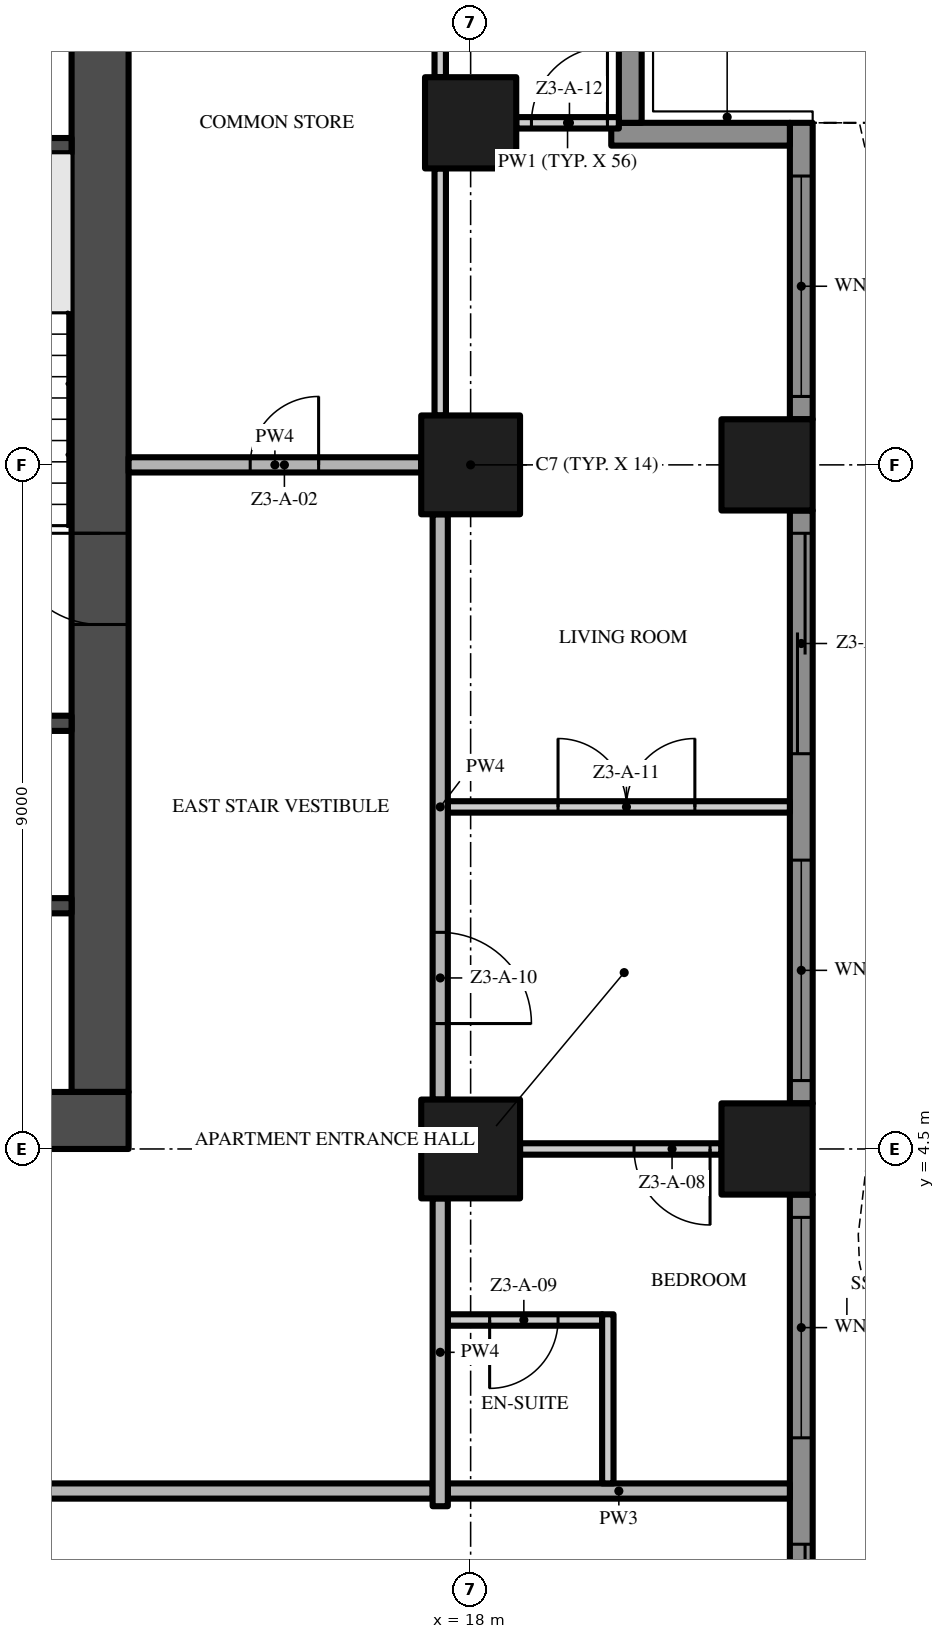
"""IFC4 building model, lengths in metres.
Left out: names, types, materials, properties, quantities, classifications, styles, units other than length and angle.
Written with IfcOpenShell. Run it as: python <this file> out.ifc"""

import sys

from ifc_helpers import new_model, si_unit, direction, frame, frame_2d, origin, origin_2d, place, context, subcontext, project, spatial, polyline, rectangle, outline, extrude, element, fill, save


model = new_model("IFC4")
c1 = context("Model", 3, precision=1e-05, world=origin(), true_north=direction((0.0, 1.0)))
c2 = subcontext(c1, "Body", "Model", "MODEL_VIEW")
j1 = project(units=[si_unit("LENGTHUNIT", "METRE"), si_unit("PLANEANGLEUNIT", "RADIAN")], contexts=[c1])
p1 = place(None, origin())
s1 = spatial("IfcSite", under=j1, at=p1, CompositionType="ELEMENT")
p2 = place(p1, origin())
s2 = spatial("IfcBuilding", under=s1, at=p2, CompositionType="ELEMENT")
p3 = place(p2, frame((0.0, 0.0, 132.6)))
s3 = spatial("IfcBuildingStorey", under=s2, at=p3, CompositionType="ELEMENT", Elevation=132.6)
p4 = place(p3, frame((-13.5, 4.875, -0.3), z_axis=(0.0, 0.0, 1.0), x_axis=(1.0, 0.0, 0.0)))
e1 = element("IfcWall", 1, at=p4, inside=s3, PredefinedType="SHEAR", context=c2, shape_type="SweptSolid", body=[
    extrude(rectangle(XDim=27.0, YDim=0.75, at=frame_2d((13.5, 0.0))), origin(), (0.0, 0.0, 1.0), 3.8),
])
p5 = place(p4, frame((12.0, 0.0, 0.3)))
e2 = element("IfcOpeningElement", 2, at=p5, cuts=e1, PredefinedType="OPENING", context=c2, shape_type="SweptSolid", body=[
    extrude(rectangle(XDim=3.0, YDim=2.4, at=frame_2d((1.5, 1.2))), frame((0.0, 0.385, 0.0), z_axis=(0.0, -1.0, 0.0), x_axis=(1.0, 0.0, 0.0)), (0.0, 0.0, 1.0), 0.77),
])
p6 = place(p4, frame((4.9, 0.0, 0.3)))
e3 = element("IfcOpeningElement", 3, at=p6, cuts=e1, PredefinedType="OPENING", context=c2, shape_type="SweptSolid", body=[
    extrude(rectangle(XDim=1.2, YDim=2.2, at=frame_2d((0.6, 1.1))), frame((0.0, 0.385, 0.0), z_axis=(0.0, -1.0, 0.0), x_axis=(1.0, 0.0, 0.0)), (0.0, 0.0, 1.0), 0.77),
])
p7 = place(p4, frame((20.75, 0.0, 0.3)))
e4 = element("IfcOpeningElement", 4, at=p7, cuts=e1, PredefinedType="OPENING", context=c2, shape_type="SweptSolid", body=[
    extrude(rectangle(XDim=1.5, YDim=2.2, at=frame_2d((0.75, 1.1))), frame((0.0, 0.385, 0.0), z_axis=(0.0, -1.0, 0.0), x_axis=(1.0, 0.0, 0.0)), (0.0, 0.0, 1.0), 0.77),
])
p8 = place(p4, frame((17.4, 0.0, 0.3)))
e5 = element("IfcOpeningElement", 5, at=p8, cuts=e1, PredefinedType="OPENING", context=c2, shape_type="SweptSolid", body=[
    extrude(rectangle(XDim=1.2, YDim=2.2, at=frame_2d((0.6, 1.1))), frame((0.0, 0.385, 0.0), z_axis=(0.0, -1.0, 0.0), x_axis=(1.0, 0.0, 0.0)), (0.0, 0.0, 1.0), 0.77),
])
p9 = place(p3, frame((13.125, 5.25, -0.3), z_axis=(0.0, 0.0, 1.0), x_axis=(0.0, 1.0, 0.0)))
e6 = element("IfcWall", 6, at=p9, inside=s3, PredefinedType="SHEAR", context=c2, shape_type="SweptSolid", body=[
    extrude(rectangle(XDim=16.5, YDim=0.75, at=frame_2d((8.25, 0.0))), origin(), (0.0, 0.0, 1.0), 3.8),
])
p10 = place(p9, frame((6.15, 0.0, 0.3)))
e7 = element("IfcOpeningElement", 7, at=p10, cuts=e6, PredefinedType="OPENING", context=c2, shape_type="SweptSolid", body=[
    extrude(rectangle(XDim=1.2, YDim=2.2, at=frame_2d((0.6, 1.1))), frame((0.0, 0.385, 0.0), z_axis=(0.0, -1.0, 0.0), x_axis=(1.0, 0.0, 0.0)), (0.0, 0.0, 1.0), 0.77),
])
for number, where, z_axis, x_axis in (
    (8, (18.0, 13.5, 0.0), (0.0, 0.0, 1.0), (1.0, 0.0, 0.0)),
    (9, (18.0, 4.5, 0.0), (0.0, 0.0, 1.0), (1.0, 0.0, 0.0)),
):
    element("IfcColumn", number, at=place(p3, frame(where, z_axis=z_axis, x_axis=x_axis)), inside=s3, PredefinedType="COLUMN", context=c2, shape_type="SweptSolid", body=[
        extrude(rectangle(XDim=1.3, YDim=1.3, at=origin_2d()), origin(), (0.0, 0.0, 1.0), 3.5),
    ])
for number, where, z_axis, x_axis in (
    (10, (21.9, 13.5, 0.0), (0.0, 0.0, 1.0), (1.0, 0.0, 0.0)),
    (11, (18.0, 18.0, 0.0), (0.0, 0.0, 1.0), (1.0, 0.0, 0.0)),
    (12, (21.9, 4.5, 0.0), (0.0, 0.0, 1.0), (1.0, 0.0, 0.0)),
):
    element("IfcColumn", number, at=place(p3, frame(where, z_axis=z_axis, x_axis=x_axis)), inside=s3, PredefinedType="COLUMN", context=c2, shape_type="SweptSolid", body=[
        extrude(rectangle(XDim=1.2, YDim=1.2, at=origin_2d()), origin(), (0.0, 0.0, 1.0), 3.5),
    ])
p11 = place(p3, frame((22.35, 3.9, 0.0), z_axis=(0.0, 0.0, 1.0), x_axis=(0.0, -1.0, 0.0)))
e13 = element("IfcWall", 13, at=p11, inside=s3, PredefinedType="SOLIDWALL", context=c2, shape_type="SweptSolid", body=[
    extrude(rectangle(XDim=7.8, YDim=0.3, at=frame_2d((3.9, 0.0))), origin(), (0.0, 0.0, 1.0), 3.5),
])
p12 = place(p11, frame((4.6, 0.0, 0.0)))
e14 = element("IfcOpeningElement", 14, at=p12, cuts=e13, PredefinedType="OPENING", context=c2, shape_type="SweptSolid", body=[
    extrude(rectangle(XDim=2.9, YDim=2.4, at=frame_2d((1.45, 1.2))), frame((0.0, 0.16, 0.0), z_axis=(0.0, -1.0, 0.0), x_axis=(1.0, 0.0, 0.0)), (0.0, 0.0, 1.0), 0.32),
])
p13 = place(p11, frame((0.3, 0.0, 0.45)))
e15 = element("IfcOpeningElement", 15, at=p13, cuts=e13, PredefinedType="OPENING", context=c2, shape_type="SweptSolid", body=[
    extrude(rectangle(XDim=2.9, YDim=2.65, at=frame_2d((1.45, 1.325))), frame((0.0, 0.16, 0.0), z_axis=(0.0, -1.0, 0.0), x_axis=(1.0, 0.0, 0.0)), (0.0, 0.0, 1.0), 0.32),
])
p14 = place(p3, frame((22.35, 12.9, 0.0), z_axis=(0.0, 0.0, 1.0), x_axis=(0.0, -1.0, 0.0)))
e16 = element("IfcWall", 16, at=p14, inside=s3, PredefinedType="SOLIDWALL", context=c2, shape_type="SweptSolid", body=[
    extrude(rectangle(XDim=7.8, YDim=0.3, at=frame_2d((3.9, 0.0))), origin(), (0.0, 0.0, 1.0), 3.5),
])
p15 = place(p14, frame((4.6, 0.0, 0.45)))
e17 = element("IfcOpeningElement", 17, at=p15, cuts=e16, PredefinedType="OPENING", context=c2, shape_type="SweptSolid", body=[
    extrude(rectangle(XDim=2.9, YDim=2.65, at=frame_2d((1.45, 1.325))), frame((0.0, 0.16, 0.0), z_axis=(0.0, -1.0, 0.0), x_axis=(1.0, 0.0, 0.0)), (0.0, 0.0, 1.0), 0.32),
])
p16 = place(p14, frame((0.3, 0.0, 0.0)))
e18 = element("IfcOpeningElement", 18, at=p16, cuts=e16, PredefinedType="OPENING", context=c2, shape_type="SweptSolid", body=[
    extrude(rectangle(XDim=2.9, YDim=2.4, at=frame_2d((1.45, 1.2))), frame((0.0, 0.16, 0.0), z_axis=(0.0, -1.0, 0.0), x_axis=(1.0, 0.0, 0.0)), (0.0, 0.0, 1.0), 0.32),
])
p17 = place(p3, frame((22.35, 18.0, 0.0), z_axis=(0.0, 0.0, 1.0), x_axis=(0.0, -1.0, 0.0)))
e19 = element("IfcWall", 19, at=p17, inside=s3, PredefinedType="SOLIDWALL", context=c2, shape_type="SweptSolid", body=[
    extrude(rectangle(XDim=3.9, YDim=0.3, at=frame_2d((1.95, 0.0))), origin(), (0.0, 0.0, 1.0), 3.5),
])
p18 = place(p17, frame((0.7, 0.0, 0.45)))
e20 = element("IfcOpeningElement", 20, at=p18, cuts=e19, PredefinedType="OPENING", context=c2, shape_type="SweptSolid", body=[
    extrude(rectangle(XDim=2.9, YDim=2.65, at=frame_2d((1.45, 1.325))), frame((0.0, 0.16, 0.0), z_axis=(0.0, -1.0, 0.0), x_axis=(1.0, 0.0, 0.0)), (0.0, 0.0, 1.0), 0.32),
])
p19 = place(p3, frame((19.85, 17.85, 0.0), z_axis=(0.0, 0.0, 1.0), x_axis=(1.0, 0.0, 0.0)))
e21 = element("IfcWall", 21, at=p19, inside=s3, PredefinedType="SOLIDWALL", context=c2, shape_type="SweptSolid", body=[
    extrude(rectangle(XDim=2.35, YDim=0.3, at=frame_2d((1.175, 0.0))), origin(), (0.0, 0.0, 1.0), 3.5),
])
p20 = place(p3, frame((20.1, 20.25, 0.0), z_axis=(0.0, 0.0, 1.0), x_axis=(0.0, -1.0, 0.0)))
e22 = element("IfcWall", 22, at=p20, inside=s3, PredefinedType="SOLIDWALL", context=c2, shape_type="SweptSolid", body=[
    extrude(rectangle(XDim=2.25, YDim=0.3, at=frame_2d((1.125, 0.0))), origin(), (0.0, 0.0, 1.0), 3.5),
])
p21 = place(p3, origin())
e23 = element("IfcWall", 23, at=p21, inside=s3, PredefinedType="USERDEFINED", context=c2, shape_type="SweptSolid", body=[
    extrude(outline(polyline([(23.451, -13.5), (23.115, -12.0), (23.1, -11.625), (23.231, -10.5), (23.755, -9.0), (24.488, -7.5), (25.149, -6.0), (25.485, -4.5), (25.5, -4.125), (25.369, -3.0), (24.845, -1.5), (24.112, 0.0), (23.451, 1.5), (23.115, 3.0), (23.1, 3.375), (23.231, 4.5), (23.755, 6.0), (24.488, 7.5), (25.149, 9.0), (25.485, 10.5), (25.5, 10.875), (25.369, 12.0), (24.845, 13.5), (24.112, 15.0), (23.451, 16.5), (23.115, 18.0), (22.871, 17.945), (23.213, 16.421), (23.885, 14.895), (24.614, 13.404), (25.124, 11.944), (25.249, 10.865), (25.236, 10.533), (24.91, 9.079), (24.261, 7.605), (23.524, 6.096), (22.986, 4.556), (22.849, 3.385), (22.866, 2.967), (23.213, 1.421), (23.885, -0.105), (24.614, -1.596), (25.124, -3.056), (25.249, -4.135), (25.236, -4.467), (24.91, -5.921), (24.261, -7.395), (23.524, -8.904), (22.986, -10.444), (22.849, -11.615), (22.866, -12.033), (23.208, -13.555), (23.451, -13.5)])), origin(), (0.0, 0.0, 1.0), 0.9),
])
for number, where, z_axis, x_axis in (
    (24, (9.65, 7.7, 0.0), (0.0, 0.0, 1.0), (1.0, 0.0, 0.0)),
    (25, (9.65, 10.1, 0.0), (0.0, 0.0, 1.0), (1.0, 0.0, 0.0)),
    (26, (9.65, 17.7, 0.0), (0.0, 0.0, 1.0), (1.0, 0.0, 0.0)),
):
    element("IfcWall", number, at=place(p3, frame(where, z_axis=z_axis, x_axis=x_axis)), inside=s3, PredefinedType="SHEAR", context=c2, shape_type="SweptSolid", body=[
        extrude(rectangle(XDim=3.1, YDim=0.2, at=frame_2d((1.55, 0.0))), origin(), (0.0, 0.0, 1.0), 3.5),
    ])
p22 = place(p3, frame((17.5, 0.0, 0.0), z_axis=(0.0, 0.0, 1.0), x_axis=(-1.0, 0.0, 0.0)))
e27 = element("IfcWall", 27, at=p22, inside=s3, PredefinedType="PARTITIONING", context=c2, shape_type="SweptSolid", body=[
    extrude(rectangle(XDim=35.0, YDim=0.2, at=frame_2d((17.5, 0.0))), origin(), (0.0, 0.0, 1.0), 3.5),
])
p23 = place(p22, frame((16.75, 0.0, 0.0)))
e28 = element("IfcOpeningElement", 28, at=p23, cuts=e27, PredefinedType="OPENING", context=c2, shape_type="SweptSolid", body=[
    extrude(rectangle(XDim=1.5, YDim=2.4, at=frame_2d((0.75, 1.2))), frame((0.0, 0.11, 0.0), z_axis=(0.0, -1.0, 0.0), x_axis=(1.0, 0.0, 0.0)), (0.0, 0.0, 1.0), 0.22),
])
p24 = place(p3, frame((17.7, 0.0, 0.0), z_axis=(0.0, 0.0, 1.0), x_axis=(1.0, 0.0, 0.0)))
e29 = element("IfcWall", 29, at=p24, inside=s3, PredefinedType="PARTITIONING", context=c2, shape_type="SweptSolid", body=[
    extrude(rectangle(XDim=4.5, YDim=0.2, at=frame_2d((2.25, 0.0))), origin(), (0.0, 0.0, 1.0), 3.5),
])
p25 = place(p3, frame((19.73, 2.25, 0.0), z_axis=(0.0, 0.0, 1.0), x_axis=(-1.0, 0.0, 0.0)))
e30 = element("IfcWall", 30, at=p25, inside=s3, PredefinedType="PARTITIONING", context=c2, shape_type="SweptSolid", body=[
    extrude(rectangle(XDim=2.03, YDim=0.15, at=frame_2d((1.015, 0.0))), origin(), (0.0, 0.0, 1.0), 3.5),
])
p26 = place(p25, frame((0.58, 0.0, 0.0)))
e31 = element("IfcOpeningElement", 31, at=p26, cuts=e30, PredefinedType="OPENING", context=c2, shape_type="SweptSolid", body=[
    extrude(rectangle(XDim=0.9, YDim=2.1, at=frame_2d((0.45, 1.05))), frame((0.0, 0.085, 0.0), z_axis=(0.0, -1.0, 0.0), x_axis=(1.0, 0.0, 0.0)), (0.0, 0.0, 1.0), 0.17),
])
p27 = place(p3, frame((21.3, 4.5, 0.0), z_axis=(0.0, 0.0, 1.0), x_axis=(-1.0, 0.0, 0.0)))
e32 = element("IfcWall", 32, at=p27, inside=s3, PredefinedType="PARTITIONING", context=c2, shape_type="SweptSolid", body=[
    extrude(rectangle(XDim=2.65, YDim=0.15, at=frame_2d((1.325, 0.0))), origin(), (0.0, 0.0, 1.0), 3.5),
])
p28 = place(p27, frame((0.15, 0.0, 0.0)))
e33 = element("IfcOpeningElement", 33, at=p28, cuts=e32, PredefinedType="OPENING", context=c2, shape_type="SweptSolid", body=[
    extrude(rectangle(XDim=1.0, YDim=2.4, at=frame_2d((0.5, 1.2))), frame((0.0, 0.085, 0.0), z_axis=(0.0, -1.0, 0.0), x_axis=(1.0, 0.0, 0.0)), (0.0, 0.0, 1.0), 0.17),
])
p29 = place(p3, frame((17.7, 9.0, 0.0), z_axis=(0.0, 0.0, 1.0), x_axis=(1.0, 0.0, 0.0)))
e34 = element("IfcWall", 34, at=p29, inside=s3, PredefinedType="PARTITIONING", context=c2, shape_type="SweptSolid", body=[
    extrude(rectangle(XDim=4.5, YDim=0.15, at=frame_2d((2.25, 0.0))), origin(), (0.0, 0.0, 1.0), 3.5),
])
p30 = place(p29, frame((1.45, 0.0, 0.0)))
e35 = element("IfcOpeningElement", 35, at=p30, cuts=e34, PredefinedType="OPENING", context=c2, shape_type="SweptSolid", body=[
    extrude(rectangle(XDim=1.8, YDim=2.4, at=frame_2d((0.9, 1.2))), frame((0.0, 0.085, 0.0), z_axis=(0.0, -1.0, 0.0), x_axis=(1.0, 0.0, 0.0)), (0.0, 0.0, 1.0), 0.17),
])
p31 = place(p3, frame((13.5, 13.5, 0.0), z_axis=(0.0, 0.0, 1.0), x_axis=(1.0, 0.0, 0.0)))
e36 = element("IfcWall", 36, at=p31, inside=s3, PredefinedType="PARTITIONING", context=c2, shape_type="SweptSolid", body=[
    extrude(rectangle(XDim=3.85, YDim=0.2, at=frame_2d((1.925, 0.0))), origin(), (0.0, 0.0, 1.0), 3.5),
])
p32 = place(p31, frame((1.6, 0.0, 0.0)))
e37 = element("IfcOpeningElement", 37, at=p32, cuts=e36, PredefinedType="OPENING", context=c2, shape_type="SweptSolid", body=[
    extrude(rectangle(XDim=0.9, YDim=2.1, at=frame_2d((0.45, 1.05))), frame((0.0, 0.11, 0.0), z_axis=(0.0, -1.0, 0.0), x_axis=(1.0, 0.0, 0.0)), (0.0, 0.0, 1.0), 0.22),
])
p33 = place(p3, frame((18.6, 18.0, 0.0), z_axis=(0.0, 0.0, 1.0), x_axis=(1.0, 0.0, 0.0)))
e38 = element("IfcWall", 38, at=p33, inside=s3, PredefinedType="PARTITIONING", context=c2, shape_type="SweptSolid", body=[
    extrude(rectangle(XDim=1.35, YDim=0.15, at=frame_2d((0.675, 0.0))), origin(), (0.0, 0.0, 1.0), 3.5),
])
p34 = place(p33, frame((0.2, 0.0, 0.0)))
e39 = element("IfcOpeningElement", 39, at=p34, cuts=e38, PredefinedType="OPENING", context=c2, shape_type="SweptSolid", body=[
    extrude(rectangle(XDim=1.0, YDim=2.4, at=frame_2d((0.5, 1.2))), frame((0.0, 0.085, 0.0), z_axis=(0.0, -1.0, 0.0), x_axis=(1.0, 0.0, 0.0)), (0.0, 0.0, 1.0), 0.17),
])
p35 = place(p3, frame((17.6, -0.2, 0.0), z_axis=(0.0, 0.0, 1.0), x_axis=(0.0, 1.0, 0.0)))
e40 = element("IfcWall", 40, at=p35, inside=s3, PredefinedType="PARTITIONING", context=c2, shape_type="SweptSolid", body=[
    extrude(rectangle(XDim=4.05, YDim=0.2, at=frame_2d((2.025, 0.0))), origin(), (0.0, 0.0, 1.0), 3.5),
])
p36 = place(p3, frame((17.6, 12.85, 0.0), z_axis=(0.0, 0.0, 1.0), x_axis=(0.0, -1.0, 0.0)))
e41 = element("IfcWall", 41, at=p36, inside=s3, PredefinedType="PARTITIONING", context=c2, shape_type="SweptSolid", body=[
    extrude(rectangle(XDim=7.7, YDim=0.2, at=frame_2d((3.85, 0.0))), origin(), (0.0, 0.0, 1.0), 3.5),
])
p37 = place(p36, frame((5.5, 0.0, 0.0)))
e42 = element("IfcOpeningElement", 42, at=p37, cuts=e41, PredefinedType="OPENING", context=c2, shape_type="SweptSolid", body=[
    extrude(rectangle(XDim=1.2, YDim=2.4, at=frame_2d((0.6, 1.2))), frame((0.0, 0.11, 0.0), z_axis=(0.0, -1.0, 0.0), x_axis=(1.0, 0.0, 0.0)), (0.0, 0.0, 1.0), 0.22),
])
p38 = place(p3, frame((17.6, 14.15, 0.0), z_axis=(0.0, 0.0, 1.0), x_axis=(0.0, 1.0, 0.0)))
e43 = element("IfcWall", 43, at=p38, inside=s3, PredefinedType="PARTITIONING", context=c2, shape_type="SweptSolid", body=[
    extrude(rectangle(XDim=3.25, YDim=0.15, at=frame_2d((1.625, 0.0))), origin(), (0.0, 0.0, 1.0), 3.5),
])
p39 = place(p3, frame((17.6, 18.6, 0.0), z_axis=(0.0, 0.0, 1.0), x_axis=(0.0, 1.0, 0.0)))
e44 = element("IfcWall", 44, at=p39, inside=s3, PredefinedType="PARTITIONING", context=c2, shape_type="SweptSolid", body=[
    extrude(rectangle(XDim=2.7, YDim=0.15, at=frame_2d((1.35, 0.0))), origin(), (0.0, 0.0, 1.0), 3.5),
])
p40 = place(p3, frame((19.805, 0.1, 0.0), z_axis=(0.0, 0.0, 1.0), x_axis=(0.0, 1.0, 0.0)))
e45 = element("IfcWall", 45, at=p40, inside=s3, PredefinedType="PARTITIONING", context=c2, shape_type="SweptSolid", body=[
    extrude(rectangle(XDim=2.225, YDim=0.15, at=frame_2d((1.113, 0.0))), origin(), (0.0, 0.0, 1.0), 3.5),
])
p41 = place(p12, origin())
e46 = element("IfcDoor", 46, at=p41, inside=s3, OperationType="SINGLE_SWING_LEFT", PredefinedType="DOOR", context=c2, shape_type="SweptSolid", body=[
    extrude(rectangle(XDim=2.9, YDim=2.4, at=frame_2d((1.45, 1.2))), frame((0.0, 0.025, 0.0), z_axis=(0.0, -1.0, 0.0), x_axis=(1.0, 0.0, 0.0)), (0.0, 0.0, 1.0), 0.05),
])
fill(e14, e46)
p42 = place(p13, origin())
e47 = element("IfcWindow", 47, at=p42, inside=s3, PartitioningType="SINGLE_PANEL", PredefinedType="WINDOW", context=c2, shape_type="SweptSolid", body=[
    extrude(rectangle(XDim=2.9, YDim=2.65, at=frame_2d((1.45, 1.325))), frame((0.0, 0.03, 0.0), z_axis=(0.0, -1.0, 0.0), x_axis=(1.0, 0.0, 0.0)), (0.0, 0.0, 1.0), 0.06),
])
fill(e15, e47)
p43 = place(p15, origin())
e48 = element("IfcWindow", 48, at=p43, inside=s3, PartitioningType="SINGLE_PANEL", PredefinedType="WINDOW", context=c2, shape_type="SweptSolid", body=[
    extrude(rectangle(XDim=2.9, YDim=2.65, at=frame_2d((1.45, 1.325))), frame((0.0, 0.03, 0.0), z_axis=(0.0, -1.0, 0.0), x_axis=(1.0, 0.0, 0.0)), (0.0, 0.0, 1.0), 0.06),
])
fill(e17, e48)
p44 = place(p16, origin())
e49 = element("IfcDoor", 49, at=p44, inside=s3, OperationType="SINGLE_SWING_LEFT", PredefinedType="DOOR", context=c2, shape_type="SweptSolid", body=[
    extrude(rectangle(XDim=2.9, YDim=2.4, at=frame_2d((1.45, 1.2))), frame((0.0, 0.025, 0.0), z_axis=(0.0, -1.0, 0.0), x_axis=(1.0, 0.0, 0.0)), (0.0, 0.0, 1.0), 0.05),
])
fill(e18, e49)
p45 = place(p18, origin())
e50 = element("IfcWindow", 50, at=p45, inside=s3, PartitioningType="SINGLE_PANEL", PredefinedType="WINDOW", context=c2, shape_type="SweptSolid", body=[
    extrude(rectangle(XDim=2.9, YDim=2.65, at=frame_2d((1.45, 1.325))), frame((0.0, 0.03, 0.0), z_axis=(0.0, -1.0, 0.0), x_axis=(1.0, 0.0, 0.0)), (0.0, 0.0, 1.0), 0.06),
])
fill(e20, e50)
p46 = place(p10, frame((1.2, 0.0, 0.0), z_axis=(0.0, 0.0, 1.0), x_axis=(-1.0, 0.0, 0.0)))
e51 = element("IfcDoor", 51, at=p46, inside=s3, OperationType="SINGLE_SWING_LEFT", PredefinedType="DOOR", context=c2, shape_type="SweptSolid", body=[
    extrude(rectangle(XDim=1.2, YDim=2.2, at=frame_2d((0.6, 1.1))), frame((0.0, 0.025, 0.0), z_axis=(0.0, -1.0, 0.0), x_axis=(1.0, 0.0, 0.0)), (0.0, 0.0, 1.0), 0.05),
])
fill(e7, e51)
p47 = place(p32, origin())
e52 = element("IfcDoor", 52, at=p47, inside=s3, OperationType="SINGLE_SWING_RIGHT", PredefinedType="DOOR", context=c2, shape_type="SweptSolid", body=[
    extrude(rectangle(XDim=0.9, YDim=2.1, at=frame_2d((0.45, 1.05))), frame((0.0, 0.025, 0.0), z_axis=(0.0, -1.0, 0.0), x_axis=(1.0, 0.0, 0.0)), (0.0, 0.0, 1.0), 0.05),
])
fill(e37, e52)
p48 = place(p28, origin())
e53 = element("IfcDoor", 53, at=p48, inside=s3, OperationType="SINGLE_SWING_LEFT", PredefinedType="DOOR", context=c2, shape_type="SweptSolid", body=[
    extrude(rectangle(XDim=1.0, YDim=2.4, at=frame_2d((0.5, 1.2))), frame((0.0, 0.025, 0.0), z_axis=(0.0, -1.0, 0.0), x_axis=(1.0, 0.0, 0.0)), (0.0, 0.0, 1.0), 0.05),
])
fill(e33, e53)
p49 = place(p26, origin())
e54 = element("IfcDoor", 54, at=p49, inside=s3, OperationType="SINGLE_SWING_RIGHT", PredefinedType="DOOR", context=c2, shape_type="SweptSolid", body=[
    extrude(rectangle(XDim=0.9, YDim=2.1, at=frame_2d((0.45, 1.05))), frame((0.0, 0.025, 0.0), z_axis=(0.0, -1.0, 0.0), x_axis=(1.0, 0.0, 0.0)), (0.0, 0.0, 1.0), 0.05),
])
fill(e31, e54)
p50 = place(p37, origin())
e55 = element("IfcDoor", 55, at=p50, inside=s3, OperationType="SINGLE_SWING_RIGHT", PredefinedType="DOOR", context=c2, shape_type="SweptSolid", body=[
    extrude(rectangle(XDim=1.2, YDim=2.4, at=frame_2d((0.6, 1.2))), frame((0.0, 0.025, 0.0), z_axis=(0.0, -1.0, 0.0), x_axis=(1.0, 0.0, 0.0)), (0.0, 0.0, 1.0), 0.05),
])
fill(e42, e55)
p51 = place(p30, origin())
e56 = element("IfcDoor", 56, at=p51, inside=s3, OperationType="DOUBLE_DOOR_SINGLE_SWING", PredefinedType="DOOR", context=c2, shape_type="SweptSolid", body=[
    extrude(rectangle(XDim=1.8, YDim=2.4, at=frame_2d((0.9, 1.2))), frame((0.0, 0.025, 0.0), z_axis=(0.0, -1.0, 0.0), x_axis=(1.0, 0.0, 0.0)), (0.0, 0.0, 1.0), 0.05),
])
fill(e35, e56)
p52 = place(p34, origin())
e57 = element("IfcDoor", 57, at=p52, inside=s3, OperationType="SINGLE_SWING_RIGHT", PredefinedType="DOOR", context=c2, shape_type="SweptSolid", body=[
    extrude(rectangle(XDim=1.0, YDim=2.4, at=frame_2d((0.5, 1.2))), frame((0.0, 0.025, 0.0), z_axis=(0.0, -1.0, 0.0), x_axis=(1.0, 0.0, 0.0)), (0.0, 0.0, 1.0), 0.05),
])
fill(e39, e57)
save(model, sys.argv[1])
